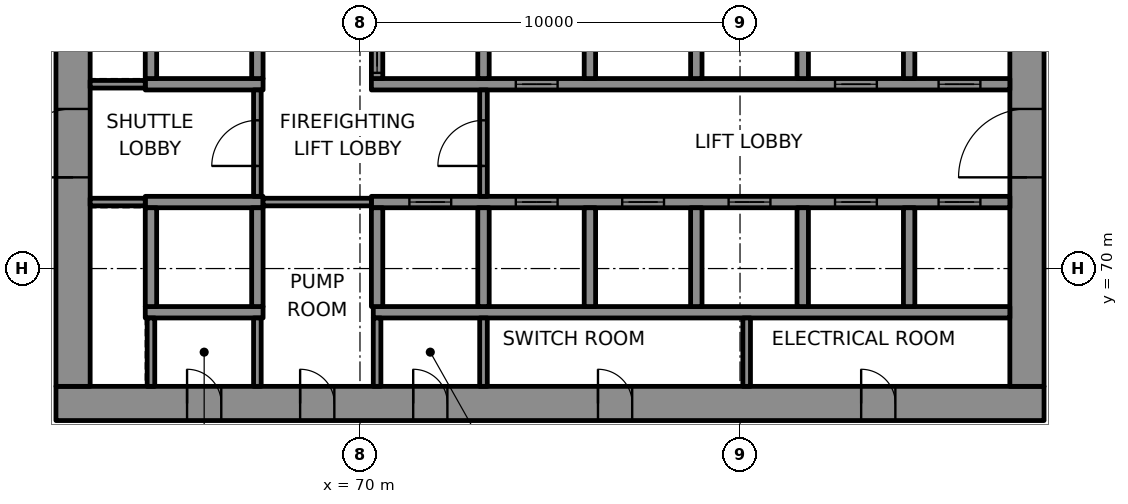
"""IFC4 building model, lengths in metres.
Left out: names, types, materials, properties, quantities, classifications, styles, units other than length and angle.
Written with IfcOpenShell. Run it as: python <this file> out.ifc"""

import sys

from ifc_helpers import new_model, si_unit, direction, frame, frame_2d, origin, place, context, subcontext, project, spatial, rectangle, extrude, element, fill, save


model = new_model("IFC4")
c1 = context("Model", 3, precision=1e-05, world=origin(), true_north=direction((0.0, 1.0)))
c2 = subcontext(c1, "Body", "Model", "MODEL_VIEW")
j1 = project(units=[si_unit("LENGTHUNIT", "METRE"), si_unit("PLANEANGLEUNIT", "RADIAN")], contexts=[c1])
p1 = place(None, origin())
s1 = spatial("IfcSite", under=j1, at=p1, CompositionType="ELEMENT")
p2 = place(p1, origin())
s2 = spatial("IfcBuilding", under=s1, at=p2, CompositionType="ELEMENT")
p3 = place(p2, frame((0.0, 0.0, 128.2)))
s3 = spatial("IfcBuildingStorey", under=s2, at=p3, CompositionType="ELEMENT", Elevation=128.2)
p4 = place(p3, frame((62.0, 66.45, 0.0), z_axis=(0.0, 0.0, 1.0), x_axis=(1.0, 0.0, 0.0)))
e1 = element("IfcWall", 1, at=p4, inside=s3, PredefinedType="SHEAR", context=c2, shape_type="SweptSolid", body=[
    extrude(rectangle(XDim=26.0, YDim=0.9, at=frame_2d((13.0, 0.0))), origin(), (0.0, 0.0, 1.0), 4.0),
])
p5 = place(p4, frame((3.45, 0.0, 0.0)))
e2 = element("IfcOpeningElement", 2, at=p5, cuts=e1, PredefinedType="OPENING", context=c2, shape_type="SweptSolid", body=[
    extrude(rectangle(XDim=0.9, YDim=2.1, at=frame_2d((0.45, 1.05))), frame((0.0, 0.46, 0.0), z_axis=(0.0, -1.0, 0.0), x_axis=(1.0, 0.0, 0.0)), (0.0, 0.0, 1.0), 0.92),
])
p6 = place(p4, frame((6.425, 0.0, 0.0)))
e3 = element("IfcOpeningElement", 3, at=p6, cuts=e1, PredefinedType="OPENING", context=c2, shape_type="SweptSolid", body=[
    extrude(rectangle(XDim=0.9, YDim=2.1, at=frame_2d((0.45, 1.05))), frame((0.0, 0.46, 0.0), z_axis=(0.0, -1.0, 0.0), x_axis=(1.0, 0.0, 0.0)), (0.0, 0.0, 1.0), 0.92),
])
p7 = place(p4, frame((9.4, 0.0, 0.0)))
e4 = element("IfcOpeningElement", 4, at=p7, cuts=e1, PredefinedType="OPENING", context=c2, shape_type="SweptSolid", body=[
    extrude(rectangle(XDim=0.9, YDim=2.1, at=frame_2d((0.45, 1.05))), frame((0.0, 0.46, 0.0), z_axis=(0.0, -1.0, 0.0), x_axis=(1.0, 0.0, 0.0)), (0.0, 0.0, 1.0), 0.92),
])
p8 = place(p4, frame((14.262, 0.0, 0.0)))
e5 = element("IfcOpeningElement", 5, at=p8, cuts=e1, PredefinedType="OPENING", context=c2, shape_type="SweptSolid", body=[
    extrude(rectangle(XDim=0.9, YDim=2.1, at=frame_2d((0.45, 1.05))), frame((0.0, 0.46, 0.0), z_axis=(0.0, -1.0, 0.0), x_axis=(1.0, 0.0, 0.0)), (0.0, 0.0, 1.0), 0.92),
])
p9 = place(p4, frame((21.188, 0.0, 0.0)))
e6 = element("IfcOpeningElement", 6, at=p9, cuts=e1, PredefinedType="OPENING", context=c2, shape_type="SweptSolid", body=[
    extrude(rectangle(XDim=0.9, YDim=2.1, at=frame_2d((0.45, 1.05))), frame((0.0, 0.46, 0.0), z_axis=(0.0, -1.0, 0.0), x_axis=(1.0, 0.0, 0.0)), (0.0, 0.0, 1.0), 0.92),
])
p10 = place(p3, frame((62.45, 66.9, 0.0), z_axis=(0.0, 0.0, 1.0), x_axis=(0.0, 1.0, 0.0)))
e7 = element("IfcWall", 7, at=p10, inside=s3, PredefinedType="SHEAR", context=c2, shape_type="SweptSolid", body=[
    extrude(rectangle(XDim=16.2, YDim=0.9, at=frame_2d((8.1, 0.0))), origin(), (0.0, 0.0, 1.0), 4.0),
])
p11 = place(p10, frame((5.5, 0.0, 0.0)))
e8 = element("IfcOpeningElement", 8, at=p11, cuts=e7, PredefinedType="OPENING", context=c2, shape_type="SweptSolid", body=[
    extrude(rectangle(XDim=1.8, YDim=2.1, at=frame_2d((0.9, 1.05))), frame((0.0, 0.46, 0.0), z_axis=(0.0, -1.0, 0.0), x_axis=(1.0, 0.0, 0.0)), (0.0, 0.0, 1.0), 0.92),
])
p12 = place(p3, frame((87.55, 66.9, 0.0), z_axis=(0.0, 0.0, 1.0), x_axis=(0.0, 1.0, 0.0)))
e9 = element("IfcWall", 9, at=p12, inside=s3, PredefinedType="SHEAR", context=c2, shape_type="SweptSolid", body=[
    extrude(rectangle(XDim=16.2, YDim=0.9, at=frame_2d((8.1, 0.0))), origin(), (0.0, 0.0, 1.0), 4.0),
])
p13 = place(p12, frame((5.5, 0.0, 0.0)))
e10 = element("IfcOpeningElement", 10, at=p13, cuts=e9, PredefinedType="OPENING", context=c2, shape_type="SweptSolid", body=[
    extrude(rectangle(XDim=1.8, YDim=2.1, at=frame_2d((0.9, 1.05))), frame((0.0, 0.46, 0.0), z_axis=(0.0, -1.0, 0.0), x_axis=(1.0, 0.0, 0.0)), (0.0, 0.0, 1.0), 0.92),
])
p14 = place(p12, frame((11.738, 0.0, 0.0)))
e11 = element("IfcOpeningElement", 11, at=p14, cuts=e9, PredefinedType="OPENING", context=c2, shape_type="SweptSolid", body=[
    extrude(rectangle(XDim=0.9, YDim=2.1, at=frame_2d((0.45, 1.05))), frame((0.0, 0.46, 0.0), z_axis=(0.0, -1.0, 0.0), x_axis=(1.0, 0.0, 0.0)), (0.0, 0.0, 1.0), 0.92),
])
p15 = place(p3, frame((64.35, 68.85, 0.0), z_axis=(0.0, 0.0, 1.0), x_axis=(1.0, 0.0, 0.0)))
e12 = element("IfcWall", 12, at=p15, inside=s3, PredefinedType="SHEAR", context=c2, shape_type="SweptSolid", body=[
    extrude(rectangle(XDim=3.1, YDim=0.3, at=frame_2d((1.55, 0.0))), origin(), (0.0, 0.0, 1.0), 4.0),
])
p16 = place(p3, frame((70.35, 68.85, 0.0), z_axis=(0.0, 0.0, 1.0), x_axis=(1.0, 0.0, 0.0)))
e13 = element("IfcWall", 13, at=p16, inside=s3, PredefinedType="SHEAR", context=c2, shape_type="SweptSolid", body=[
    extrude(rectangle(XDim=16.75, YDim=0.3, at=frame_2d((8.375, 0.0))), origin(), (0.0, 0.0, 1.0), 4.0),
])
p17 = place(p3, frame((64.35, 71.75, 0.0), z_axis=(0.0, 0.0, 1.0), x_axis=(1.0, 0.0, 0.0)))
e14 = element("IfcWall", 14, at=p17, inside=s3, PredefinedType="SHEAR", context=c2, shape_type="SweptSolid", body=[
    extrude(rectangle(XDim=3.1, YDim=0.3, at=frame_2d((1.55, 0.0))), origin(), (0.0, 0.0, 1.0), 4.0),
])
p18 = place(p3, frame((70.3, 71.75, 0.0), z_axis=(0.0, 0.0, 1.0), x_axis=(1.0, 0.0, 0.0)))
e15 = element("IfcWall", 15, at=p18, inside=s3, PredefinedType="SHEAR", context=c2, shape_type="SweptSolid", body=[
    extrude(rectangle(XDim=16.8, YDim=0.3, at=frame_2d((8.4, 0.0))), origin(), (0.0, 0.0, 1.0), 4.0),
])
p19 = place(p18, frame((1.0, 0.0, 0.0)))
e16 = element("IfcOpeningElement", 16, at=p19, cuts=e15, PredefinedType="OPENING", context=c2, shape_type="SweptSolid", body=[
    extrude(rectangle(XDim=1.1, YDim=2.1, at=frame_2d((0.55, 1.05))), frame((0.0, 0.16, 0.0), z_axis=(0.0, -1.0, 0.0), x_axis=(1.0, 0.0, 0.0)), (0.0, 0.0, 1.0), 0.32),
])
p20 = place(p18, frame((3.8, 0.0, 0.0)))
e17 = element("IfcOpeningElement", 17, at=p20, cuts=e15, PredefinedType="OPENING", context=c2, shape_type="SweptSolid", body=[
    extrude(rectangle(XDim=1.1, YDim=2.1, at=frame_2d((0.55, 1.05))), frame((0.0, 0.16, 0.0), z_axis=(0.0, -1.0, 0.0), x_axis=(1.0, 0.0, 0.0)), (0.0, 0.0, 1.0), 0.32),
])
p21 = place(p18, frame((6.6, 0.0, 0.0)))
e18 = element("IfcOpeningElement", 18, at=p21, cuts=e15, PredefinedType="OPENING", context=c2, shape_type="SweptSolid", body=[
    extrude(rectangle(XDim=1.1, YDim=2.1, at=frame_2d((0.55, 1.05))), frame((0.0, 0.16, 0.0), z_axis=(0.0, -1.0, 0.0), x_axis=(1.0, 0.0, 0.0)), (0.0, 0.0, 1.0), 0.32),
])
p22 = place(p18, frame((9.4, 0.0, 0.0)))
e19 = element("IfcOpeningElement", 19, at=p22, cuts=e15, PredefinedType="OPENING", context=c2, shape_type="SweptSolid", body=[
    extrude(rectangle(XDim=1.1, YDim=2.1, at=frame_2d((0.55, 1.05))), frame((0.0, 0.16, 0.0), z_axis=(0.0, -1.0, 0.0), x_axis=(1.0, 0.0, 0.0)), (0.0, 0.0, 1.0), 0.32),
])
p23 = place(p18, frame((12.2, 0.0, 0.0)))
e20 = element("IfcOpeningElement", 20, at=p23, cuts=e15, PredefinedType="OPENING", context=c2, shape_type="SweptSolid", body=[
    extrude(rectangle(XDim=1.1, YDim=2.1, at=frame_2d((0.55, 1.05))), frame((0.0, 0.16, 0.0), z_axis=(0.0, -1.0, 0.0), x_axis=(1.0, 0.0, 0.0)), (0.0, 0.0, 1.0), 0.32),
])
p24 = place(p18, frame((14.925, 0.0, 0.0)))
e21 = element("IfcOpeningElement", 21, at=p24, cuts=e15, PredefinedType="OPENING", context=c2, shape_type="SweptSolid", body=[
    extrude(rectangle(XDim=1.1, YDim=2.1, at=frame_2d((0.55, 1.05))), frame((0.0, 0.16, 0.0), z_axis=(0.0, -1.0, 0.0), x_axis=(1.0, 0.0, 0.0)), (0.0, 0.0, 1.0), 0.32),
])
p25 = place(p3, frame((64.35, 74.85, 0.0), z_axis=(0.0, 0.0, 1.0), x_axis=(1.0, 0.0, 0.0)))
e22 = element("IfcWall", 22, at=p25, inside=s3, PredefinedType="SHEAR", context=c2, shape_type="SweptSolid", body=[
    extrude(rectangle(XDim=3.1, YDim=0.3, at=frame_2d((1.55, 0.0))), origin(), (0.0, 0.0, 1.0), 4.0),
])
p26 = place(p3, frame((70.3, 74.85, 0.0), z_axis=(0.0, 0.0, 1.0), x_axis=(1.0, 0.0, 0.0)))
e23 = element("IfcWall", 23, at=p26, inside=s3, PredefinedType="SHEAR", context=c2, shape_type="SweptSolid", body=[
    extrude(rectangle(XDim=16.8, YDim=0.3, at=frame_2d((8.4, 0.0))), origin(), (0.0, 0.0, 1.0), 4.0),
])
p27 = place(p26, frame((3.8, 0.0, 0.0)))
e24 = element("IfcOpeningElement", 24, at=p27, cuts=e23, PredefinedType="OPENING", context=c2, shape_type="SweptSolid", body=[
    extrude(rectangle(XDim=1.1, YDim=2.1, at=frame_2d((0.55, 1.05))), frame((0.0, 0.16, 0.0), z_axis=(0.0, -1.0, 0.0), x_axis=(1.0, 0.0, 0.0)), (0.0, 0.0, 1.0), 0.32),
])
p28 = place(p26, frame((12.2, 0.0, 0.0)))
e25 = element("IfcOpeningElement", 25, at=p28, cuts=e23, PredefinedType="OPENING", context=c2, shape_type="SweptSolid", body=[
    extrude(rectangle(XDim=1.1, YDim=2.1, at=frame_2d((0.55, 1.05))), frame((0.0, 0.16, 0.0), z_axis=(0.0, -1.0, 0.0), x_axis=(1.0, 0.0, 0.0)), (0.0, 0.0, 1.0), 0.32),
])
p29 = place(p26, frame((14.925, 0.0, 0.0)))
e26 = element("IfcOpeningElement", 26, at=p29, cuts=e23, PredefinedType="OPENING", context=c2, shape_type="SweptSolid", body=[
    extrude(rectangle(XDim=1.1, YDim=2.1, at=frame_2d((0.55, 1.05))), frame((0.0, 0.16, 0.0), z_axis=(0.0, -1.0, 0.0), x_axis=(1.0, 0.0, 0.0)), (0.0, 0.0, 1.0), 0.32),
])
for number, where, z_axis, x_axis in (
    (27, (64.5, 69.0, 0.0), (0.0, 0.0, 1.0), (0.0, 1.0, 0.0)),
    (28, (64.5, 75.0, 0.0), (0.0, 0.0, 1.0), (0.0, 1.0, 0.0)),
    (29, (67.3, 69.0, 0.0), (0.0, 0.0, 1.0), (0.0, 1.0, 0.0)),
    (30, (67.3, 75.0, 0.0), (0.0, 0.0, 1.0), (0.0, 1.0, 0.0)),
    (31, (70.45, 69.0, 0.0), (0.0, 0.0, 1.0), (0.0, 1.0, 0.0)),
):
    element("IfcWall", number, at=place(p3, frame(where, z_axis=z_axis, x_axis=x_axis)), inside=s3, PredefinedType="SHEAR", context=c2, shape_type="SweptSolid", body=[
        extrude(rectangle(XDim=2.6, YDim=0.3, at=frame_2d((1.3, 0.0))), origin(), (0.0, 0.0, 1.0), 4.0),
    ])
p30 = place(p3, frame((70.45, 75.0, 0.0), z_axis=(0.0, 0.0, 1.0), x_axis=(0.0, 1.0, 0.0)))
e32 = element("IfcWall", 32, at=p30, inside=s3, PredefinedType="SHEAR", context=c2, shape_type="SweptSolid", body=[
    extrude(rectangle(XDim=2.6, YDim=0.3, at=frame_2d((1.3, 0.0))), origin(), (0.0, 0.0, 1.0), 4.0),
])
p31 = place(p30, frame((0.15, 0.0, 0.0)))
e33 = element("IfcOpeningElement", 33, at=p31, cuts=e32, PredefinedType="OPENING", context=c2, shape_type="SweptSolid", body=[
    extrude(rectangle(XDim=1.1, YDim=2.1, at=frame_2d((0.55, 1.05))), frame((0.0, 0.16, 0.0), z_axis=(0.0, -1.0, 0.0), x_axis=(1.0, 0.0, 0.0)), (0.0, 0.0, 1.0), 0.32),
])
for number, where, z_axis, x_axis in (
    (34, (73.25, 69.0, 0.0), (0.0, 0.0, 1.0), (0.0, 1.0, 0.0)),
    (35, (73.25, 75.0, 0.0), (0.0, 0.0, 1.0), (0.0, 1.0, 0.0)),
    (36, (76.05, 69.0, 0.0), (0.0, 0.0, 1.0), (0.0, 1.0, 0.0)),
    (37, (76.05, 75.0, 0.0), (0.0, 0.0, 1.0), (0.0, 1.0, 0.0)),
    (38, (78.85, 69.0, 0.0), (0.0, 0.0, 1.0), (0.0, 1.0, 0.0)),
    (39, (78.85, 75.0, 0.0), (0.0, 0.0, 1.0), (0.0, 1.0, 0.0)),
    (40, (81.65, 69.0, 0.0), (0.0, 0.0, 1.0), (0.0, 1.0, 0.0)),
    (41, (81.65, 75.0, 0.0), (0.0, 0.0, 1.0), (0.0, 1.0, 0.0)),
    (42, (84.45, 69.0, 0.0), (0.0, 0.0, 1.0), (0.0, 1.0, 0.0)),
    (43, (84.45, 75.0, 0.0), (0.0, 0.0, 1.0), (0.0, 1.0, 0.0)),
):
    element("IfcWall", number, at=place(p3, frame(where, z_axis=z_axis, x_axis=x_axis)), inside=s3, PredefinedType="SHEAR", context=c2, shape_type="SweptSolid", body=[
        extrude(rectangle(XDim=2.6, YDim=0.3, at=frame_2d((1.3, 0.0))), origin(), (0.0, 0.0, 1.0), 4.0),
    ])
p32 = place(p3, frame((62.9, 71.75, 0.0), z_axis=(0.0, 0.0, 1.0), x_axis=(1.0, 0.0, 0.0)))
e44 = element("IfcWall", 44, at=p32, inside=s3, PredefinedType="PARTITIONING", context=c2, shape_type="SweptSolid", body=[
    extrude(rectangle(XDim=1.45, YDim=0.2, at=frame_2d((0.725, 0.0))), origin(), (0.0, 0.0, 1.0), 4.0),
])
p33 = place(p3, frame((67.45, 71.75, 0.0), z_axis=(0.0, 0.0, 1.0), x_axis=(1.0, 0.0, 0.0)))
e45 = element("IfcWall", 45, at=p33, inside=s3, PredefinedType="PARTITIONING", context=c2, shape_type="SweptSolid", body=[
    extrude(rectangle(XDim=2.85, YDim=0.2, at=frame_2d((1.425, 0.0))), origin(), (0.0, 0.0, 1.0), 4.0),
])
p34 = place(p3, frame((62.9, 74.85, 0.0), z_axis=(0.0, 0.0, 1.0), x_axis=(1.0, 0.0, 0.0)))
e46 = element("IfcWall", 46, at=p34, inside=s3, PredefinedType="PARTITIONING", context=c2, shape_type="SweptSolid", body=[
    extrude(rectangle(XDim=1.45, YDim=0.2, at=frame_2d((0.725, 0.0))), origin(), (0.0, 0.0, 1.0), 4.0),
])
for number, where, z_axis, x_axis in (
    (47, (64.5, 66.9, 0.0), (0.0, 0.0, 1.0), (0.0, 1.0, 0.0)),
    (48, (67.3, 66.9, 0.0), (0.0, 0.0, 1.0), (0.0, 1.0, 0.0)),
):
    element("IfcWall", number, at=place(p3, frame(where, z_axis=z_axis, x_axis=x_axis)), inside=s3, PredefinedType="PARTITIONING", context=c2, shape_type="SweptSolid", body=[
        extrude(rectangle(XDim=1.8, YDim=0.2, at=frame_2d((0.9, 0.0))), origin(), (0.0, 0.0, 1.0), 4.0),
    ])
p35 = place(p3, frame((67.3, 71.9, 0.0), z_axis=(0.0, 0.0, 1.0), x_axis=(0.0, 1.0, 0.0)))
e49 = element("IfcWall", 49, at=p35, inside=s3, PredefinedType="PARTITIONING", context=c2, shape_type="SweptSolid", body=[
    extrude(rectangle(XDim=2.8, YDim=0.2, at=frame_2d((1.4, 0.0))), origin(), (0.0, 0.0, 1.0), 4.0),
])
p36 = place(p35, frame((0.8, 0.0, 0.0)))
e50 = element("IfcOpeningElement", 50, at=p36, cuts=e49, PredefinedType="OPENING", context=c2, shape_type="SweptSolid", body=[
    extrude(rectangle(XDim=1.2, YDim=2.1, at=frame_2d((0.6, 1.05))), frame((0.0, 0.11, 0.0), z_axis=(0.0, -1.0, 0.0), x_axis=(1.0, 0.0, 0.0)), (0.0, 0.0, 1.0), 0.22),
])
for number, where, z_axis, x_axis in (
    (51, (70.45, 66.9, 0.0), (0.0, 0.0, 1.0), (0.0, 1.0, 0.0)),
    (52, (73.25, 66.9, 0.0), (0.0, 0.0, 1.0), (0.0, 1.0, 0.0)),
):
    element("IfcWall", number, at=place(p3, frame(where, z_axis=z_axis, x_axis=x_axis)), inside=s3, PredefinedType="PARTITIONING", context=c2, shape_type="SweptSolid", body=[
        extrude(rectangle(XDim=1.8, YDim=0.2, at=frame_2d((0.9, 0.0))), origin(), (0.0, 0.0, 1.0), 4.0),
    ])
p37 = place(p3, frame((73.25, 71.9, 0.0), z_axis=(0.0, 0.0, 1.0), x_axis=(0.0, 1.0, 0.0)))
e53 = element("IfcWall", 53, at=p37, inside=s3, PredefinedType="PARTITIONING", context=c2, shape_type="SweptSolid", body=[
    extrude(rectangle(XDim=2.8, YDim=0.2, at=frame_2d((1.4, 0.0))), origin(), (0.0, 0.0, 1.0), 4.0),
])
p38 = place(p37, frame((0.8, 0.0, 0.0)))
e54 = element("IfcOpeningElement", 54, at=p38, cuts=e53, PredefinedType="OPENING", context=c2, shape_type="SweptSolid", body=[
    extrude(rectangle(XDim=1.2, YDim=2.1, at=frame_2d((0.6, 1.05))), frame((0.0, 0.11, 0.0), z_axis=(0.0, -1.0, 0.0), x_axis=(1.0, 0.0, 0.0)), (0.0, 0.0, 1.0), 0.22),
])
p39 = place(p3, frame((80.175, 66.9, 0.0), z_axis=(0.0, 0.0, 1.0), x_axis=(0.0, 1.0, 0.0)))
e55 = element("IfcWall", 55, at=p39, inside=s3, PredefinedType="PARTITIONING", context=c2, shape_type="SweptSolid", body=[
    extrude(rectangle(XDim=1.8, YDim=0.2, at=frame_2d((0.9, 0.0))), origin(), (0.0, 0.0, 1.0), 4.0),
])
p40 = place(p19, origin())
e56 = element("IfcDoor", 56, at=p40, inside=s3, OperationType="DOUBLE_DOOR_SLIDING", PredefinedType="DOOR", context=c2, shape_type="SweptSolid", body=[
    extrude(rectangle(XDim=1.1, YDim=2.1, at=frame_2d((0.55, 1.05))), frame((0.0, 0.025, 0.0), z_axis=(0.0, -1.0, 0.0), x_axis=(1.0, 0.0, 0.0)), (0.0, 0.0, 1.0), 0.05),
])
fill(e16, e56)
p41 = place(p20, origin())
e57 = element("IfcDoor", 57, at=p41, inside=s3, OperationType="DOUBLE_DOOR_SLIDING", PredefinedType="DOOR", context=c2, shape_type="SweptSolid", body=[
    extrude(rectangle(XDim=1.1, YDim=2.1, at=frame_2d((0.55, 1.05))), frame((0.0, 0.025, 0.0), z_axis=(0.0, -1.0, 0.0), x_axis=(1.0, 0.0, 0.0)), (0.0, 0.0, 1.0), 0.05),
])
fill(e17, e57)
p42 = place(p21, origin())
e58 = element("IfcDoor", 58, at=p42, inside=s3, OperationType="DOUBLE_DOOR_SLIDING", PredefinedType="DOOR", context=c2, shape_type="SweptSolid", body=[
    extrude(rectangle(XDim=1.1, YDim=2.1, at=frame_2d((0.55, 1.05))), frame((0.0, 0.025, 0.0), z_axis=(0.0, -1.0, 0.0), x_axis=(1.0, 0.0, 0.0)), (0.0, 0.0, 1.0), 0.05),
])
fill(e18, e58)
p43 = place(p22, origin())
e59 = element("IfcDoor", 59, at=p43, inside=s3, OperationType="DOUBLE_DOOR_SLIDING", PredefinedType="DOOR", context=c2, shape_type="SweptSolid", body=[
    extrude(rectangle(XDim=1.1, YDim=2.1, at=frame_2d((0.55, 1.05))), frame((0.0, 0.025, 0.0), z_axis=(0.0, -1.0, 0.0), x_axis=(1.0, 0.0, 0.0)), (0.0, 0.0, 1.0), 0.05),
])
fill(e19, e59)
p44 = place(p23, origin())
e60 = element("IfcDoor", 60, at=p44, inside=s3, OperationType="DOUBLE_DOOR_SLIDING", PredefinedType="DOOR", context=c2, shape_type="SweptSolid", body=[
    extrude(rectangle(XDim=1.1, YDim=2.1, at=frame_2d((0.55, 1.05))), frame((0.0, 0.025, 0.0), z_axis=(0.0, -1.0, 0.0), x_axis=(1.0, 0.0, 0.0)), (0.0, 0.0, 1.0), 0.05),
])
fill(e20, e60)
p45 = place(p24, origin())
e61 = element("IfcDoor", 61, at=p45, inside=s3, OperationType="DOUBLE_DOOR_SLIDING", PredefinedType="DOOR", context=c2, shape_type="SweptSolid", body=[
    extrude(rectangle(XDim=1.1, YDim=2.1, at=frame_2d((0.55, 1.05))), frame((0.0, 0.025, 0.0), z_axis=(0.0, -1.0, 0.0), x_axis=(1.0, 0.0, 0.0)), (0.0, 0.0, 1.0), 0.05),
])
fill(e21, e61)
p46 = place(p31, origin())
e62 = element("IfcDoor", 62, at=p46, inside=s3, OperationType="DOUBLE_DOOR_SLIDING", PredefinedType="DOOR", context=c2, shape_type="SweptSolid", body=[
    extrude(rectangle(XDim=1.1, YDim=2.1, at=frame_2d((0.55, 1.05))), frame((0.0, 0.025, 0.0), z_axis=(0.0, -1.0, 0.0), x_axis=(1.0, 0.0, 0.0)), (0.0, 0.0, 1.0), 0.05),
])
fill(e33, e62)
p47 = place(p27, origin())
e63 = element("IfcDoor", 63, at=p47, inside=s3, OperationType="DOUBLE_DOOR_SLIDING", PredefinedType="DOOR", context=c2, shape_type="SweptSolid", body=[
    extrude(rectangle(XDim=1.1, YDim=2.1, at=frame_2d((0.55, 1.05))), frame((0.0, 0.025, 0.0), z_axis=(0.0, -1.0, 0.0), x_axis=(1.0, 0.0, 0.0)), (0.0, 0.0, 1.0), 0.05),
])
fill(e24, e63)
p48 = place(p28, origin())
e64 = element("IfcDoor", 64, at=p48, inside=s3, OperationType="DOUBLE_DOOR_SLIDING", PredefinedType="DOOR", context=c2, shape_type="SweptSolid", body=[
    extrude(rectangle(XDim=1.1, YDim=2.1, at=frame_2d((0.55, 1.05))), frame((0.0, 0.025, 0.0), z_axis=(0.0, -1.0, 0.0), x_axis=(1.0, 0.0, 0.0)), (0.0, 0.0, 1.0), 0.05),
])
fill(e25, e64)
p49 = place(p29, origin())
e65 = element("IfcDoor", 65, at=p49, inside=s3, OperationType="DOUBLE_DOOR_SLIDING", PredefinedType="DOOR", context=c2, shape_type="SweptSolid", body=[
    extrude(rectangle(XDim=1.1, YDim=2.1, at=frame_2d((0.55, 1.05))), frame((0.0, 0.025, 0.0), z_axis=(0.0, -1.0, 0.0), x_axis=(1.0, 0.0, 0.0)), (0.0, 0.0, 1.0), 0.05),
])
fill(e26, e65)
p50 = place(p38, origin())
e66 = element("IfcDoor", 66, at=p50, inside=s3, OperationType="SINGLE_SWING_LEFT", PredefinedType="DOOR", context=c2, shape_type="SweptSolid", body=[
    extrude(rectangle(XDim=1.2, YDim=2.1, at=frame_2d((0.6, 1.05))), frame((0.0, 0.025, 0.0), z_axis=(0.0, -1.0, 0.0), x_axis=(1.0, 0.0, 0.0)), (0.0, 0.0, 1.0), 0.05),
])
fill(e54, e66)
p51 = place(p36, origin())
e67 = element("IfcDoor", 67, at=p51, inside=s3, OperationType="SINGLE_SWING_RIGHT", PredefinedType="DOOR", context=c2, shape_type="SweptSolid", body=[
    extrude(rectangle(XDim=1.2, YDim=2.1, at=frame_2d((0.6, 1.05))), frame((0.0, 0.025, 0.0), z_axis=(0.0, -1.0, 0.0), x_axis=(1.0, 0.0, 0.0)), (0.0, 0.0, 1.0), 0.05),
])
fill(e50, e67)
p52 = place(p11, origin())
e68 = element("IfcDoor", 68, at=p52, inside=s3, OperationType="SINGLE_SWING_LEFT", PredefinedType="DOOR", context=c2, shape_type="SweptSolid", body=[
    extrude(rectangle(XDim=1.8, YDim=2.1, at=frame_2d((0.9, 1.05))), frame((0.0, 0.17, 0.0), z_axis=(0.0, -1.0, 0.0), x_axis=(1.0, 0.0, 0.0)), (0.0, 0.0, 1.0), 0.34),
])
fill(e8, e68)
p53 = place(p13, origin())
e69 = element("IfcDoor", 69, at=p53, inside=s3, OperationType="SINGLE_SWING_RIGHT", PredefinedType="DOOR", context=c2, shape_type="SweptSolid", body=[
    extrude(rectangle(XDim=1.8, YDim=2.1, at=frame_2d((0.9, 1.05))), frame((0.0, 0.17, 0.0), z_axis=(0.0, -1.0, 0.0), x_axis=(1.0, 0.0, 0.0)), (0.0, 0.0, 1.0), 0.34),
])
fill(e10, e69)
p54 = place(p5, origin())
e70 = element("IfcDoor", 70, at=p54, inside=s3, OperationType="SINGLE_SWING_LEFT", PredefinedType="DOOR", context=c2, shape_type="SweptSolid", body=[
    extrude(rectangle(XDim=0.9, YDim=2.1, at=frame_2d((0.45, 1.05))), frame((0.0, 0.17, 0.0), z_axis=(0.0, -1.0, 0.0), x_axis=(1.0, 0.0, 0.0)), (0.0, 0.0, 1.0), 0.34),
])
fill(e2, e70)
p55 = place(p6, origin())
e71 = element("IfcDoor", 71, at=p55, inside=s3, OperationType="SINGLE_SWING_RIGHT", PredefinedType="DOOR", context=c2, shape_type="SweptSolid", body=[
    extrude(rectangle(XDim=0.9, YDim=2.1, at=frame_2d((0.45, 1.05))), frame((0.0, 0.17, 0.0), z_axis=(0.0, -1.0, 0.0), x_axis=(1.0, 0.0, 0.0)), (0.0, 0.0, 1.0), 0.34),
])
fill(e3, e71)
p56 = place(p7, origin())
e72 = element("IfcDoor", 72, at=p56, inside=s3, OperationType="SINGLE_SWING_LEFT", PredefinedType="DOOR", context=c2, shape_type="SweptSolid", body=[
    extrude(rectangle(XDim=0.9, YDim=2.1, at=frame_2d((0.45, 1.05))), frame((0.0, 0.17, 0.0), z_axis=(0.0, -1.0, 0.0), x_axis=(1.0, 0.0, 0.0)), (0.0, 0.0, 1.0), 0.34),
])
fill(e4, e72)
p57 = place(p8, origin())
e73 = element("IfcDoor", 73, at=p57, inside=s3, OperationType="SINGLE_SWING_RIGHT", PredefinedType="DOOR", context=c2, shape_type="SweptSolid", body=[
    extrude(rectangle(XDim=0.9, YDim=2.1, at=frame_2d((0.45, 1.05))), frame((0.0, 0.17, 0.0), z_axis=(0.0, -1.0, 0.0), x_axis=(1.0, 0.0, 0.0)), (0.0, 0.0, 1.0), 0.34),
])
fill(e5, e73)
p58 = place(p9, origin())
e74 = element("IfcDoor", 74, at=p58, inside=s3, OperationType="SINGLE_SWING_LEFT", PredefinedType="DOOR", context=c2, shape_type="SweptSolid", body=[
    extrude(rectangle(XDim=0.9, YDim=2.1, at=frame_2d((0.45, 1.05))), frame((0.0, 0.17, 0.0), z_axis=(0.0, -1.0, 0.0), x_axis=(1.0, 0.0, 0.0)), (0.0, 0.0, 1.0), 0.34),
])
fill(e6, e74)
save(model, sys.argv[1])
